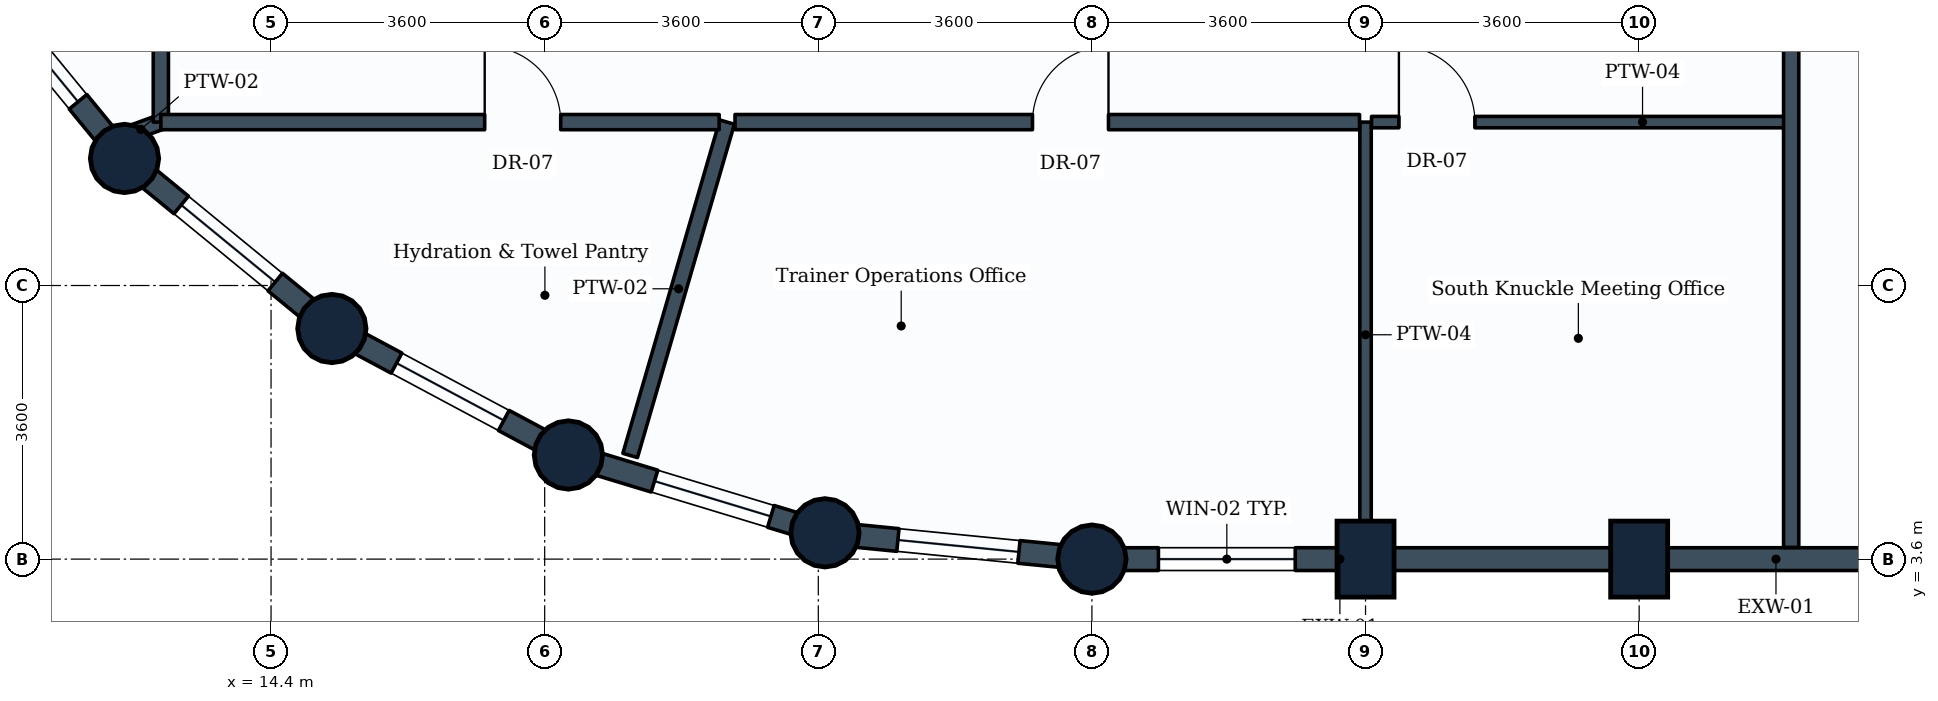
"""IFC4 building model, lengths in metres.
Left out: names, types, materials, properties, quantities, classifications, styles, units other than length and angle.
Written with IfcOpenShell. Run it as: python <this file> out.ifc"""

import sys

from ifc_helpers import new_model, si_unit, direction, frame, frame_2d, origin, origin_2d, place, context, subcontext, project, spatial, rectangle, circle, extrude, element, fill, save


model = new_model("IFC4")
c1 = context("Model", 3, precision=1e-05, world=origin(), true_north=direction((0.0, 1.0)))
c2 = subcontext(c1, "Body", "Model", "MODEL_VIEW")
j1 = project(units=[si_unit("LENGTHUNIT", "METRE"), si_unit("PLANEANGLEUNIT", "RADIAN")], contexts=[c1])
p1 = place(None, origin())
s1 = spatial("IfcSite", under=j1, at=p1, CompositionType="ELEMENT")
p2 = place(p1, origin())
s2 = spatial("IfcBuilding", under=s1, at=p2, CompositionType="ELEMENT")
p3 = place(p2, frame((0.0, 0.0, 150.4)))
s3 = spatial("IfcBuildingStorey", under=s2, at=p3, CompositionType="ELEMENT", Elevation=150.4)
for number, where, z_axis, x_axis in (
    (1, (12.472, 8.872, 0.0), (0.0, 0.0, 1.0), (1.0, 0.0, 0.0)),
    (2, (15.2, 6.634, 0.0), (0.0, 0.0, 1.0), (1.0, 0.0, 0.0)),
    (3, (18.312, 4.97, 0.0), (0.0, 0.0, 1.0), (1.0, 0.0, 0.0)),
    (4, (21.688, 3.946, 0.0), (0.0, 0.0, 1.0), (1.0, 0.0, 0.0)),
    (5, (25.2, 3.6, 0.0), (0.0, 0.0, 1.0), (1.0, 0.0, 0.0)),
):
    element("IfcColumn", number, at=place(p3, frame(where, z_axis=z_axis, x_axis=x_axis)), inside=s3, PredefinedType="COLUMN", context=c2, shape_type="SweptSolid", body=[
        extrude(circle(Radius=0.45, at=origin_2d()), origin(), (0.0, 0.0, 1.0), 3.8),
    ])
for number, where, z_axis, x_axis in (
    (6, (28.8, 3.6, 0.0), (0.0, 0.0, 1.0), (1.0, 0.0, 0.0)),
    (7, (32.4, 3.6, 0.0), (0.0, 0.0, 1.0), (1.0, 0.0, 0.0)),
):
    element("IfcColumn", number, at=place(p3, frame(where, z_axis=z_axis, x_axis=x_axis)), inside=s3, PredefinedType="COLUMN", context=c2, shape_type="SweptSolid", body=[
        extrude(rectangle(XDim=0.75, YDim=1.0, at=origin_2d()), origin(), (0.0, 0.0, 1.0), 3.8),
    ])
p4 = place(p3, frame((28.8, 3.6, 0.0), z_axis=(0.0, 0.0, 1.0), x_axis=(-1.0, 0.0, 0.0)))
e8 = element("IfcWall", 8, at=p4, inside=s3, PredefinedType="STANDARD", context=c2, shape_type="SweptSolid", body=[
    extrude(rectangle(XDim=3.6, YDim=0.3, at=frame_2d((1.8, 0.0))), origin(), (0.0, 0.0, 1.0), 2.93),
])
p5 = place(p4, frame((0.925, 0.0, 0.85)))
e9 = element("IfcOpeningElement", 9, at=p5, cuts=e8, PredefinedType="OPENING", context=c2, shape_type="SweptSolid", body=[
    extrude(rectangle(XDim=1.8, YDim=1.35, at=frame_2d((0.9, 0.675))), frame((0.0, 0.16, 0.0), z_axis=(0.0, -1.0, 0.0), x_axis=(1.0, 0.0, 0.0)), (0.0, 0.0, 1.0), 0.32),
])
p6 = place(p3, frame((32.4, 3.6, 0.0), z_axis=(0.0, 0.0, 1.0), x_axis=(-1.0, 0.0, 0.0)))
e10 = element("IfcWall", 10, at=p6, inside=s3, PredefinedType="STANDARD", context=c2, shape_type="SweptSolid", body=[
    extrude(rectangle(XDim=3.6, YDim=0.3, at=frame_2d((1.8, 0.0))), origin(), (0.0, 0.0, 1.0), 2.93),
])
p7 = place(p3, frame((36.0, 3.6, 0.0), z_axis=(0.0, 0.0, 1.0), x_axis=(-1.0, 0.0, 0.0)))
e11 = element("IfcWall", 11, at=p7, inside=s3, PredefinedType="STANDARD", context=c2, shape_type="SweptSolid", body=[
    extrude(rectangle(XDim=3.6, YDim=0.3, at=frame_2d((1.8, 0.0))), origin(), (0.0, 0.0, 1.0), 2.93),
])
p8 = place(p3, frame((12.472, 8.872, 0.0), z_axis=(0.0, 0.0, 1.0), x_axis=(-0.634258295121, 0.773121216285, 0.0)))
e12 = element("IfcWall", 12, at=p8, inside=s3, PredefinedType="STANDARD", context=c2, shape_type="SweptSolid", body=[
    extrude(rectangle(XDim=3.529, YDim=0.3, at=frame_2d((1.764, 0.0))), origin(), (0.0, 0.0, 1.0), 2.93),
])
p9 = place(p8, frame((0.964, 0.0, 0.85)))
e13 = element("IfcOpeningElement", 13, at=p9, cuts=e12, PredefinedType="OPENING", context=c2, shape_type="SweptSolid", body=[
    extrude(rectangle(XDim=1.6, YDim=1.35, at=frame_2d((0.8, 0.675))), frame((0.0, 0.16, 0.0), z_axis=(0.0, -1.0, 0.0), x_axis=(1.0, 0.0, 0.0)), (0.0, 0.0, 1.0), 0.32),
])
p10 = place(p3, frame((15.2, 6.634, 0.0), z_axis=(0.0, 0.0, 1.0), x_axis=(-0.773121216285, 0.634258295121, 0.0)))
e14 = element("IfcWall", 14, at=p10, inside=s3, PredefinedType="STANDARD", context=c2, shape_type="SweptSolid", body=[
    extrude(rectangle(XDim=3.529, YDim=0.3, at=frame_2d((1.764, 0.0))), origin(), (0.0, 0.0, 1.0), 2.93),
])
p11 = place(p10, frame((0.964, 0.0, 0.85)))
e15 = element("IfcOpeningElement", 15, at=p11, cuts=e14, PredefinedType="OPENING", context=c2, shape_type="SweptSolid", body=[
    extrude(rectangle(XDim=1.6, YDim=1.35, at=frame_2d((0.8, 0.675))), frame((0.0, 0.16, 0.0), z_axis=(0.0, -1.0, 0.0), x_axis=(1.0, 0.0, 0.0)), (0.0, 0.0, 1.0), 0.32),
])
p12 = place(p3, frame((18.312, 4.97, 0.0), z_axis=(0.0, 0.0, 1.0), x_axis=(-0.881846862014, 0.471535907389, 0.0)))
e16 = element("IfcWall", 16, at=p12, inside=s3, PredefinedType="STANDARD", context=c2, shape_type="SweptSolid", body=[
    extrude(rectangle(XDim=3.529, YDim=0.3, at=frame_2d((1.765, 0.0))), origin(), (0.0, 0.0, 1.0), 2.93),
])
p13 = place(p12, frame((0.964, 0.0, 0.85)))
e17 = element("IfcOpeningElement", 17, at=p13, cuts=e16, PredefinedType="OPENING", context=c2, shape_type="SweptSolid", body=[
    extrude(rectangle(XDim=1.6, YDim=1.35, at=frame_2d((0.8, 0.675))), frame((0.0, 0.16, 0.0), z_axis=(0.0, -1.0, 0.0), x_axis=(1.0, 0.0, 0.0)), (0.0, 0.0, 1.0), 0.32),
])
p14 = place(p3, frame((21.688, 3.946, 0.0), z_axis=(0.0, 0.0, 1.0), x_axis=(-0.956953367403, 0.290241714123, 0.0)))
e18 = element("IfcWall", 18, at=p14, inside=s3, PredefinedType="STANDARD", context=c2, shape_type="SweptSolid", body=[
    extrude(rectangle(XDim=3.528, YDim=0.3, at=frame_2d((1.764, 0.0))), origin(), (0.0, 0.0, 1.0), 2.93),
])
p15 = place(p14, frame((0.744, 0.0, 0.85)))
e19 = element("IfcOpeningElement", 19, at=p15, cuts=e18, PredefinedType="OPENING", context=c2, shape_type="SweptSolid", body=[
    extrude(rectangle(XDim=1.6, YDim=1.35, at=frame_2d((0.8, 0.675))), frame((0.0, 0.16, 0.0), z_axis=(0.0, -1.0, 0.0), x_axis=(1.0, 0.0, 0.0)), (0.0, 0.0, 1.0), 0.32),
])
p16 = place(p3, frame((25.2, 3.6, 0.0), z_axis=(0.0, 0.0, 1.0), x_axis=(-0.995183369056, 0.098030923459, 0.0)))
e20 = element("IfcWall", 20, at=p16, inside=s3, PredefinedType="STANDARD", context=c2, shape_type="SweptSolid", body=[
    extrude(rectangle(XDim=3.529, YDim=0.3, at=frame_2d((1.765, 0.0))), origin(), (0.0, 0.0, 1.0), 2.93),
])
p17 = place(p16, frame((0.965, 0.0, 0.85)))
e21 = element("IfcOpeningElement", 21, at=p17, cuts=e20, PredefinedType="OPENING", context=c2, shape_type="SweptSolid", body=[
    extrude(rectangle(XDim=1.6, YDim=1.35, at=frame_2d((0.8, 0.675))), frame((0.0, 0.16, 0.0), z_axis=(0.0, -1.0, 0.0), x_axis=(1.0, 0.0, 0.0)), (0.0, 0.0, 1.0), 0.32),
])
p18 = place(p3, frame((28.8, 9.35, 0.0), z_axis=(0.0, 0.0, 1.0), x_axis=(0.0, -1.0, 0.0)))
e22 = element("IfcWall", 22, at=p18, inside=s3, PredefinedType="PARTITIONING", context=c2, shape_type="SweptSolid", body=[
    extrude(rectangle(XDim=5.596, YDim=0.15, at=frame_2d((2.798, 0.0))), origin(), (0.0, 0.0, 1.0), 3.535),
])
p19 = place(p3, frame((12.95, 9.35, 0.0), z_axis=(0.0, 0.0, 1.0), x_axis=(-0.939538101119, -0.342444384601, 0.0)))
e23 = element("IfcWall", 23, at=p19, inside=s3, PredefinedType="PARTITIONING", context=c2, shape_type="SweptSolid", body=[
    extrude(rectangle(XDim=0.559, YDim=0.2, at=frame_2d((0.279, 0.0))), origin(), (0.0, 0.0, 1.0), 2.93),
])
p20 = place(p3, frame((20.4, 9.35, 0.0), z_axis=(0.0, 0.0, 1.0), x_axis=(-0.279158408615, -0.960245063981, 0.0)))
e24 = element("IfcWall", 24, at=p20, inside=s3, PredefinedType="PARTITIONING", context=c2, shape_type="SweptSolid", body=[
    extrude(rectangle(XDim=4.568, YDim=0.2, at=frame_2d((2.284, 0.0))), origin(), (0.0, 0.0, 1.0), 2.93),
])
p21 = place(p3, frame((12.95, 9.35, 0.0), z_axis=(0.0, 0.0, 1.0), x_axis=(0.0, 1.0, 0.0)))
e25 = element("IfcWall", 25, at=p21, inside=s3, PredefinedType="PARTITIONING", context=c2, shape_type="SweptSolid", body=[
    extrude(rectangle(XDim=7.346, YDim=0.2, at=frame_2d((3.673, 0.0))), origin(), (0.0, 0.0, 1.0), 3.17),
])
p22 = place(p21, frame((4.261, 0.0, 0.0)))
e26 = element("IfcOpeningElement", 26, at=p22, cuts=e25, PredefinedType="OPENING", context=c2, shape_type="SweptSolid", body=[
    extrude(rectangle(XDim=1.0, YDim=2.1, at=frame_2d((0.5, 1.05))), frame((0.0, 0.11, 0.0), z_axis=(0.0, -1.0, 0.0), x_axis=(1.0, 0.0, 0.0)), (0.0, 0.0, 1.0), 0.22),
])
p23 = place(p3, frame((12.95, 9.35, 0.0), z_axis=(0.0, 0.0, 1.0), x_axis=(1.0, 0.0, 0.0)))
e27 = element("IfcWall", 27, at=p23, inside=s3, PredefinedType="PARTITIONING", context=c2, shape_type="SweptSolid", body=[
    extrude(rectangle(XDim=7.346, YDim=0.2, at=frame_2d((3.673, 0.0))), origin(), (0.0, 0.0, 1.0), 3.18),
])
p24 = place(p23, frame((4.261, 0.0, 0.0)))
e28 = element("IfcOpeningElement", 28, at=p24, cuts=e27, PredefinedType="OPENING", context=c2, shape_type="SweptSolid", body=[
    extrude(rectangle(XDim=1.0, YDim=2.1, at=frame_2d((0.5, 1.05))), frame((0.0, 0.11, 0.0), z_axis=(0.0, -1.0, 0.0), x_axis=(1.0, 0.0, 0.0)), (0.0, 0.0, 1.0), 0.22),
])
p25 = place(p3, frame((20.504, 9.35, 0.0), z_axis=(0.0, 0.0, 1.0), x_axis=(1.0, 0.0, 0.0)))
e29 = element("IfcWall", 29, at=p25, inside=s3, PredefinedType="PARTITIONING", context=c2, shape_type="SweptSolid", body=[
    extrude(rectangle(XDim=8.217, YDim=0.2, at=frame_2d((4.108, 0.0))), origin(), (0.0, 0.0, 1.0), 3.17),
])
p26 = place(p25, frame((3.914, 0.0, 0.0)))
e30 = element("IfcOpeningElement", 30, at=p26, cuts=e29, PredefinedType="OPENING", context=c2, shape_type="SweptSolid", body=[
    extrude(rectangle(XDim=1.0, YDim=2.1, at=frame_2d((0.5, 1.05))), frame((0.0, 0.11, 0.0), z_axis=(0.0, -1.0, 0.0), x_axis=(1.0, 0.0, 0.0)), (0.0, 0.0, 1.0), 0.22),
])
p27 = place(p3, frame((28.879, 9.35, 0.0), z_axis=(0.0, 0.0, 1.0), x_axis=(1.0, 0.0, 0.0)))
e31 = element("IfcWall", 31, at=p27, inside=s3, PredefinedType="PARTITIONING", context=c2, shape_type="SweptSolid", body=[
    extrude(rectangle(XDim=5.521, YDim=0.15, at=frame_2d((2.76, 0.0))), origin(), (0.0, 0.0, 1.0), 3.535),
])
p28 = place(p27, frame((0.36, 0.0, 0.0)))
e32 = element("IfcOpeningElement", 32, at=p28, cuts=e31, PredefinedType="OPENING", context=c2, shape_type="SweptSolid", body=[
    extrude(rectangle(XDim=1.0, YDim=2.1, at=frame_2d((0.5, 1.05))), frame((0.0, 0.085, 0.0), z_axis=(0.0, -1.0, 0.0), x_axis=(1.0, 0.0, 0.0)), (0.0, 0.0, 1.0), 0.17),
])
p29 = place(p3, frame((34.4, 3.754, 0.0), z_axis=(0.0, 0.0, 1.0), x_axis=(0.0, 1.0, 0.0)))
e33 = element("IfcWall", 33, at=p29, inside=s3, PredefinedType="PARTITIONING", context=c2, shape_type="SweptSolid", body=[
    extrude(rectangle(XDim=14.096, YDim=0.2, at=frame_2d((7.048, 0.0))), origin(), (0.0, 0.0, 1.0), 2.93),
])
p30 = place(p5, origin())
e34 = element("IfcWindow", 34, at=p30, inside=s3, PartitioningType="SINGLE_PANEL", PredefinedType="WINDOW", context=c2, shape_type="SweptSolid", body=[
    extrude(rectangle(XDim=1.8, YDim=1.35, at=frame_2d((0.9, 0.675))), frame((0.0, 0.03, 0.0), z_axis=(0.0, -1.0, 0.0), x_axis=(1.0, 0.0, 0.0)), (0.0, 0.0, 1.0), 0.06),
])
fill(e9, e34)
p31 = place(p9, origin())
e35 = element("IfcWindow", 35, at=p31, inside=s3, PartitioningType="SINGLE_PANEL", PredefinedType="WINDOW", context=c2, shape_type="SweptSolid", body=[
    extrude(rectangle(XDim=1.6, YDim=1.35, at=frame_2d((0.8, 0.675))), frame((0.0, 0.03, 0.0), z_axis=(0.0, -1.0, 0.0), x_axis=(1.0, 0.0, 0.0)), (0.0, 0.0, 1.0), 0.06),
])
fill(e13, e35)
p32 = place(p11, origin())
e36 = element("IfcWindow", 36, at=p32, inside=s3, PartitioningType="SINGLE_PANEL", PredefinedType="WINDOW", context=c2, shape_type="SweptSolid", body=[
    extrude(rectangle(XDim=1.6, YDim=1.35, at=frame_2d((0.8, 0.675))), frame((0.0, 0.03, 0.0), z_axis=(0.0, -1.0, 0.0), x_axis=(1.0, 0.0, 0.0)), (0.0, 0.0, 1.0), 0.06),
])
fill(e15, e36)
p33 = place(p13, origin())
e37 = element("IfcWindow", 37, at=p33, inside=s3, PartitioningType="SINGLE_PANEL", PredefinedType="WINDOW", context=c2, shape_type="SweptSolid", body=[
    extrude(rectangle(XDim=1.6, YDim=1.35, at=frame_2d((0.8, 0.675))), frame((0.0, 0.03, 0.0), z_axis=(0.0, -1.0, 0.0), x_axis=(1.0, 0.0, 0.0)), (0.0, 0.0, 1.0), 0.06),
])
fill(e17, e37)
p34 = place(p15, origin())
e38 = element("IfcWindow", 38, at=p34, inside=s3, PartitioningType="SINGLE_PANEL", PredefinedType="WINDOW", context=c2, shape_type="SweptSolid", body=[
    extrude(rectangle(XDim=1.6, YDim=1.35, at=frame_2d((0.8, 0.675))), frame((0.0, 0.03, 0.0), z_axis=(0.0, -1.0, 0.0), x_axis=(1.0, 0.0, 0.0)), (0.0, 0.0, 1.0), 0.06),
])
fill(e19, e38)
p35 = place(p17, origin())
e39 = element("IfcWindow", 39, at=p35, inside=s3, PartitioningType="SINGLE_PANEL", PredefinedType="WINDOW", context=c2, shape_type="SweptSolid", body=[
    extrude(rectangle(XDim=1.6, YDim=1.35, at=frame_2d((0.8, 0.675))), frame((0.0, 0.03, 0.0), z_axis=(0.0, -1.0, 0.0), x_axis=(1.0, 0.0, 0.0)), (0.0, 0.0, 1.0), 0.06),
])
fill(e21, e39)
p36 = place(p24, origin())
e40 = element("IfcDoor", 40, at=p36, inside=s3, OperationType="SINGLE_SWING_LEFT", PredefinedType="DOOR", context=c2, shape_type="SweptSolid", body=[
    extrude(rectangle(XDim=1.0, YDim=2.1, at=frame_2d((0.5, 1.05))), frame((0.0, 0.025, 0.0), z_axis=(0.0, -1.0, 0.0), x_axis=(1.0, 0.0, 0.0)), (0.0, 0.0, 1.0), 0.05),
])
fill(e28, e40)
p37 = place(p26, origin())
e41 = element("IfcDoor", 41, at=p37, inside=s3, OperationType="SINGLE_SWING_RIGHT", PredefinedType="DOOR", context=c2, shape_type="SweptSolid", body=[
    extrude(rectangle(XDim=1.0, YDim=2.1, at=frame_2d((0.5, 1.05))), frame((0.0, 0.025, 0.0), z_axis=(0.0, -1.0, 0.0), x_axis=(1.0, 0.0, 0.0)), (0.0, 0.0, 1.0), 0.05),
])
fill(e30, e41)
p38 = place(p28, origin())
e42 = element("IfcDoor", 42, at=p38, inside=s3, OperationType="SINGLE_SWING_LEFT", PredefinedType="DOOR", context=c2, shape_type="SweptSolid", body=[
    extrude(rectangle(XDim=1.0, YDim=2.1, at=frame_2d((0.5, 1.05))), frame((0.0, 0.025, 0.0), z_axis=(0.0, -1.0, 0.0), x_axis=(1.0, 0.0, 0.0)), (0.0, 0.0, 1.0), 0.05),
])
fill(e32, e42)
save(model, sys.argv[1])
